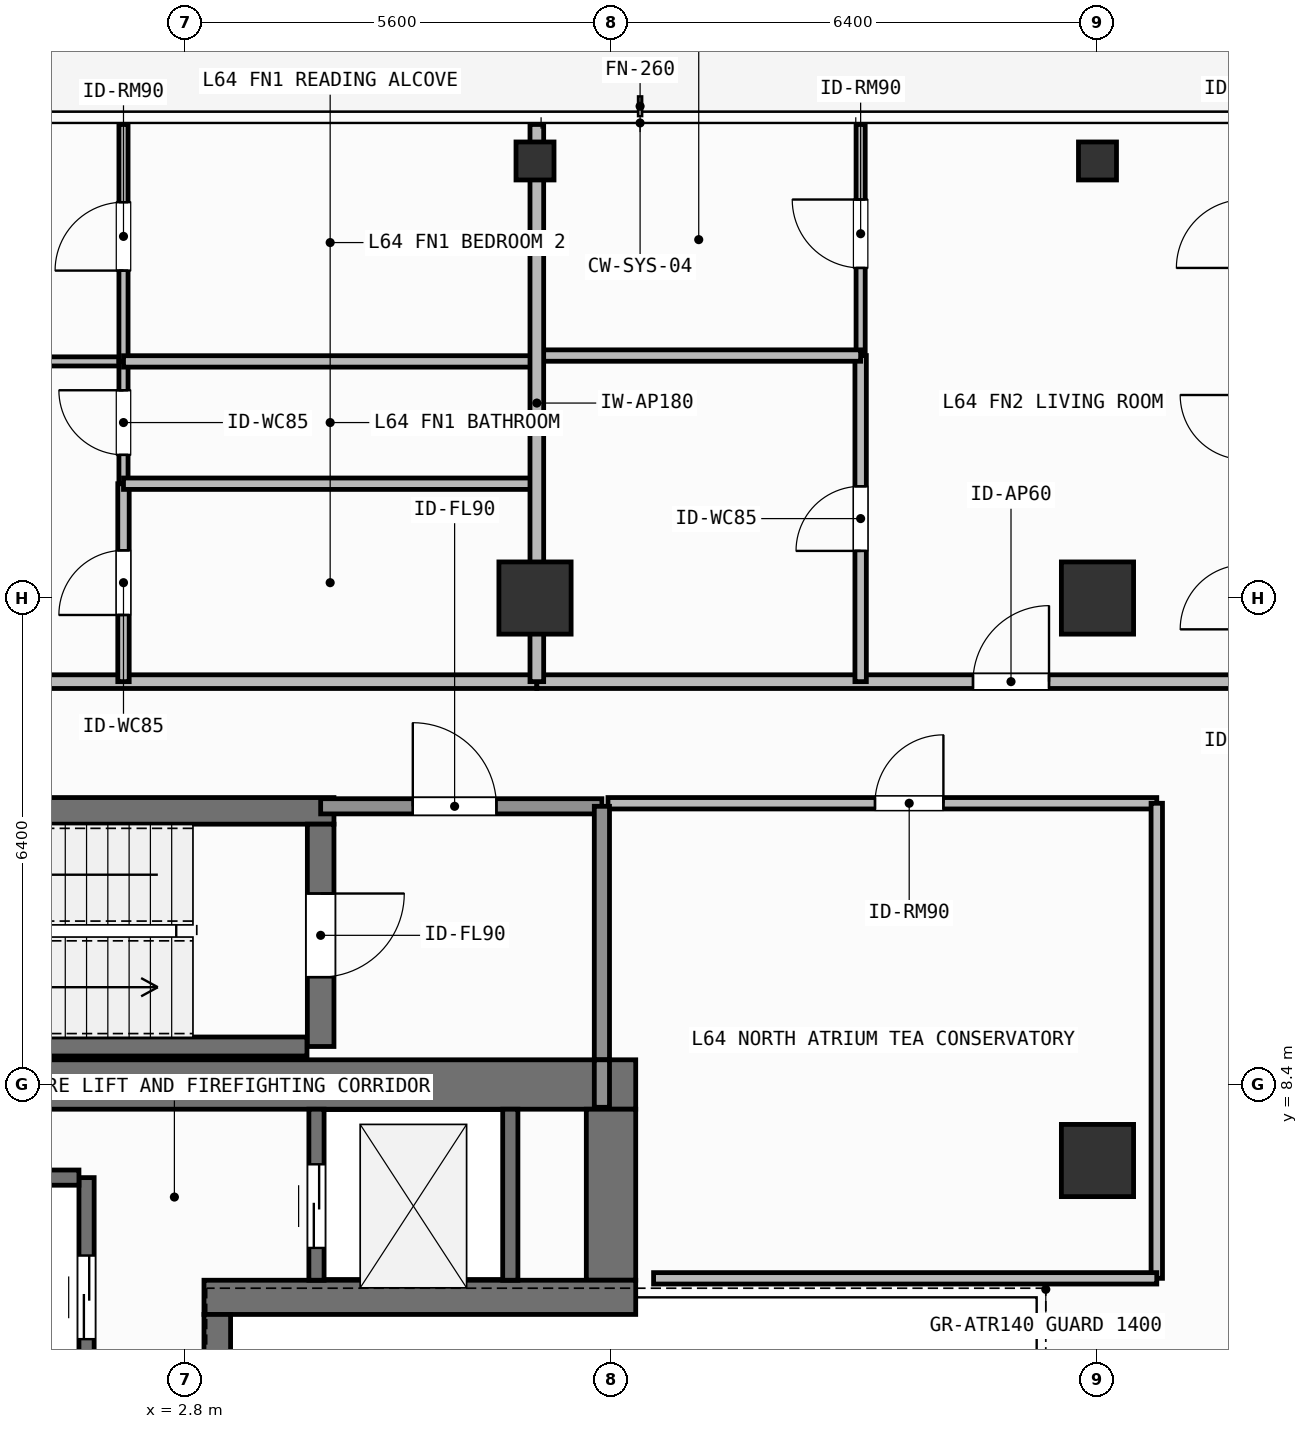
"""IFC4 building model, lengths in metres.
Left out: names, types, materials, properties, quantities, classifications, styles, units other than length and angle.
Written with IfcOpenShell. Run it as: python <this file> out.ifc"""

import sys

from ifc_helpers import new_model, si_unit, direction, frame, frame_2d, origin, origin_2d, place, context, subcontext, project, spatial, rectangle, hollow_rectangle, extrude, element, fill, save


model = new_model("IFC4")
c1 = context("Model", 3, precision=1e-05, world=origin(), true_north=direction((0.0, 1.0)))
c2 = subcontext(c1, "Body", "Model", "MODEL_VIEW")
j1 = project(units=[si_unit("LENGTHUNIT", "METRE"), si_unit("PLANEANGLEUNIT", "RADIAN")], contexts=[c1])
p1 = place(None, origin())
s1 = spatial("IfcSite", under=j1, at=p1, CompositionType="ELEMENT")
p2 = place(p1, origin())
s2 = spatial("IfcBuilding", under=s1, at=p2, CompositionType="ELEMENT")
p3 = place(p2, frame((0.0, 0.0, 262.5)))
s3 = spatial("IfcBuildingStorey", under=s2, at=p3, CompositionType="ELEMENT", Elevation=262.5)
p4 = place(p3, frame((-7.55, 8.4, 0.0), z_axis=(0.0, 0.0, 1.0), x_axis=(1.0, 0.0, 0.0)))
e1 = element("IfcWall", 1, at=p4, inside=s3, PredefinedType="SHEAR", context=c2, shape_type="SweptSolid", body=[
    extrude(rectangle(XDim=16.275, YDim=0.65, at=frame_2d((8.138, 0.0))), origin(), (0.0, 0.0, 1.0), 3.9),
])
p5 = place(p3, frame((8.4, 5.825, 0.0), z_axis=(0.0, 0.0, 1.0), x_axis=(0.0, 1.0, 0.0)))
e2 = element("IfcWall", 2, at=p5, inside=s3, PredefinedType="SHEAR", context=c2, shape_type="SweptSolid", body=[
    extrude(rectangle(XDim=2.25, YDim=0.65, at=frame_2d((1.125, 0.0))), origin(), (0.0, 0.0, 1.0), 3.9),
])
p6 = place(p3, frame((3.045, 5.6, 0.0), z_axis=(0.0, 0.0, 1.0), x_axis=(1.0, 0.0, 0.0)))
e3 = element("IfcWall", 3, at=p6, inside=s3, PredefinedType="SHEAR", context=c2, shape_type="SweptSolid", body=[
    extrude(rectangle(XDim=5.68, YDim=0.45, at=frame_2d((2.84, 0.0))), origin(), (0.0, 0.0, 1.0), 3.9),
])
p7 = place(p3, frame((3.22, -5.375, 0.0), z_axis=(0.0, 0.0, 1.0), x_axis=(0.0, 1.0, 0.0)))
e4 = element("IfcWall", 4, at=p7, inside=s3, PredefinedType="SHEAR", context=c2, shape_type="SweptSolid", body=[
    extrude(rectangle(XDim=10.75, YDim=0.35, at=frame_2d((5.375, 0.0))), origin(), (0.0, 0.0, 1.0), 3.9),
])
p8 = place(p3, frame((-2.555, 12.0, 0.0), z_axis=(0.0, 0.0, 1.0), x_axis=(1.0, 0.0, 0.0)))
e5 = element("IfcWall", 5, at=p8, inside=s3, PredefinedType="SHEAR", context=c2, shape_type="SweptSolid", body=[
    extrude(rectangle(XDim=7.31, YDim=0.35, at=frame_2d((3.655, 0.0))), origin(), (0.0, 0.0, 1.0), 3.9),
])
p9 = place(p3, frame((-2.2, 8.9, 0.0), z_axis=(0.0, 0.0, 1.0), x_axis=(1.0, 0.0, 0.0)))
e6 = element("IfcWall", 6, at=p9, inside=s3, PredefinedType="SHEAR", context=c2, shape_type="SweptSolid", body=[
    extrude(rectangle(XDim=6.6, YDim=0.25, at=frame_2d((3.3, 0.0))), origin(), (0.0, 0.0, 1.0), 3.9),
])
p10 = place(p3, frame((4.58, 11.825, 0.0), z_axis=(0.0, 0.0, 1.0), x_axis=(0.0, -1.0, 0.0)))
e7 = element("IfcWall", 7, at=p10, inside=s3, PredefinedType="SHEAR", context=c2, shape_type="SweptSolid", body=[
    extrude(rectangle(XDim=2.925, YDim=0.35, at=frame_2d((1.462, 0.0))), origin(), (0.0, 0.0, 1.0), 3.9),
])
p11 = place(p10, frame((0.913, 0.0, 0.0)))
e8 = element("IfcOpeningElement", 8, at=p11, cuts=e7, PredefinedType="OPENING", context=c2, shape_type="SweptSolid", body=[
    extrude(rectangle(XDim=1.1, YDim=2.15, at=frame_2d((0.55, 1.075))), frame((0.0, 0.185, 0.0), z_axis=(0.0, -1.0, 0.0), x_axis=(1.0, 0.0, 0.0)), (0.0, 0.0, 1.0), 0.37),
])
for number, where, z_axis, x_axis in (
    (9, (7.4, 14.8, 0.0), (0.0, 0.0, 1.0), (1.0, 0.0, 0.0)),
    (10, (14.8, 14.8, 0.0), (0.0, 0.0, 1.0), (1.0, 0.0, 0.0)),
    (11, (14.8, 7.4, 0.0), (0.0, 0.0, 1.0), (1.0, 0.0, 0.0)),
):
    element("IfcColumn", number, at=place(p3, frame(where, z_axis=z_axis, x_axis=x_axis)), inside=s3, PredefinedType="COLUMN", context=c2, shape_type="SweptSolid", body=[
        extrude(rectangle(XDim=0.95, YDim=0.95, at=origin_2d()), origin(), (0.0, 0.0, 1.0), 3.9),
    ])
for number, where, z_axis, x_axis in (
    (12, (7.4, 20.55, 0.0), (0.0, 0.0, 1.0), (1.0, 0.0, 0.0)),
    (13, (14.8, 20.55, 0.0), (0.0, 0.0, 1.0), (1.0, 0.0, 0.0)),
):
    element("IfcColumn", number, at=place(p3, frame(where, z_axis=z_axis, x_axis=x_axis)), inside=s3, PredefinedType="COLUMN", context=c2, shape_type="SweptSolid", body=[
        extrude(hollow_rectangle(XDim=0.5, YDim=0.5, WallThickness=0.025, at=origin_2d()), origin(), (0.0, 0.0, 1.0), 3.9),
    ])
p12 = place(p3, frame((1.5, 4.025, 0.0), z_axis=(0.0, 0.0, 1.0), x_axis=(0.0, 1.0, 0.0)))
e14 = element("IfcWall", 14, at=p12, inside=s3, PredefinedType="SHEAR", context=c2, shape_type="SweptSolid", body=[
    extrude(rectangle(XDim=3.15, YDim=0.2, at=frame_2d((1.575, 0.0))), origin(), (0.0, 0.0, 1.0), 3.68),
])
p13 = place(p12, frame((1.025, 0.0, 0.0)))
e15 = element("IfcOpeningElement", 15, at=p13, cuts=e14, PredefinedType="OPENING", context=c2, shape_type="SweptSolid", body=[
    extrude(rectangle(XDim=1.1, YDim=2.2, at=frame_2d((0.55, 1.1))), frame((0.0, 0.11, 0.0), z_axis=(0.0, -1.0, 0.0), x_axis=(1.0, 0.0, 0.0)), (0.0, 0.0, 1.0), 0.22),
])
p14 = place(p3, frame((-1.0, 7.175, 0.0), z_axis=(0.0, 0.0, 1.0), x_axis=(1.0, 0.0, 0.0)))
e16 = element("IfcWall", 16, at=p14, inside=s3, PredefinedType="SHEAR", context=c2, shape_type="SweptSolid", body=[
    extrude(rectangle(XDim=2.4, YDim=0.2, at=frame_2d((1.2, 0.0))), origin(), (0.0, 0.0, 1.0), 3.68),
])
p15 = place(p3, frame((4.525, 5.825, 0.0), z_axis=(0.0, 0.0, 1.0), x_axis=(0.0, 1.0, 0.0)))
e17 = element("IfcWall", 17, at=p15, inside=s3, PredefinedType="SHEAR", context=c2, shape_type="SweptSolid", body=[
    extrude(rectangle(XDim=2.25, YDim=0.2, at=frame_2d((1.125, 0.0))), origin(), (0.0, 0.0, 1.0), 3.68),
])
p16 = place(p15, frame((0.425, 0.0, 0.0)))
e18 = element("IfcOpeningElement", 18, at=p16, cuts=e17, PredefinedType="OPENING", context=c2, shape_type="SweptSolid", body=[
    extrude(rectangle(XDim=1.1, YDim=2.2, at=frame_2d((0.55, 1.1))), frame((0.0, 0.11, 0.0), z_axis=(0.0, -1.0, 0.0), x_axis=(1.0, 0.0, 0.0)), (0.0, 0.0, 1.0), 0.22),
])
p17 = place(p3, frame((7.075, 5.825, 0.0), z_axis=(0.0, 0.0, 1.0), x_axis=(0.0, 1.0, 0.0)))
e19 = element("IfcWall", 19, at=p17, inside=s3, PredefinedType="SHEAR", context=c2, shape_type="SweptSolid", body=[
    extrude(rectangle(XDim=2.25, YDim=0.2, at=frame_2d((1.125, 0.0))), origin(), (0.0, 0.0, 1.0), 3.68),
])
p18 = place(p3, frame((4.58, 12.06, 0.0), z_axis=(0.0, 0.0, 1.0), x_axis=(1.0, 0.0, 0.0)))
e20 = element("IfcWall", 20, at=p18, inside=s3, PredefinedType="SOLIDWALL", context=c2, shape_type="SweptSolid", body=[
    extrude(rectangle(XDim=3.7, YDim=0.2, at=frame_2d((1.85, 0.0))), origin(), (0.0, 0.0, 1.0), 3.68),
])
p19 = place(p18, frame((1.212, 0.0, 0.0)))
e21 = element("IfcOpeningElement", 21, at=p19, cuts=e20, PredefinedType="OPENING", context=c2, shape_type="SweptSolid", body=[
    extrude(rectangle(XDim=1.1, YDim=2.15, at=frame_2d((0.55, 1.075))), frame((0.0, 0.11, 0.0), z_axis=(0.0, -1.0, 0.0), x_axis=(1.0, 0.0, 0.0)), (0.0, 0.0, 1.0), 0.22),
])
p20 = place(p3, frame((8.36, 12.1, 0.0), z_axis=(0.0, 0.0, 1.0), x_axis=(1.0, 0.0, 0.0)))
e22 = element("IfcWall", 22, at=p20, inside=s3, PredefinedType="PARTITIONING", context=c2, shape_type="SweptSolid", body=[
    extrude(rectangle(XDim=7.22, YDim=0.15, at=frame_2d((3.61, 0.0))), origin(), (0.0, 0.0, 1.0), 3.68),
])
p21 = place(p20, frame((3.513, 0.0, 0.0)))
e23 = element("IfcOpeningElement", 23, at=p21, cuts=e22, PredefinedType="OPENING", context=c2, shape_type="SweptSolid", body=[
    extrude(rectangle(XDim=0.9, YDim=2.1, at=frame_2d((0.45, 1.05))), frame((0.0, 0.085, 0.0), z_axis=(0.0, -1.0, 0.0), x_axis=(1.0, 0.0, 0.0)), (0.0, 0.0, 1.0), 0.17),
])
p22 = place(p3, frame((-13.72, 13.7, 0.0), z_axis=(0.0, 0.0, 1.0), x_axis=(1.0, 0.0, 0.0)))
e24 = element("IfcWall", 24, at=p22, inside=s3, PredefinedType="PARTITIONING", context=c2, shape_type="SweptSolid", body=[
    extrude(rectangle(XDim=21.144, YDim=0.18, at=frame_2d((10.572, 0.0))), origin(), (0.0, 0.0, 1.0), 3.68),
])
p23 = place(p22, frame((9.625, 0.0, 0.0)))
e25 = element("IfcOpeningElement", 25, at=p23, cuts=e24, PredefinedType="OPENING", context=c2, shape_type="SweptSolid", body=[
    extrude(rectangle(XDim=1.0, YDim=2.2, at=frame_2d((0.5, 1.1))), frame((0.0, 0.1, 0.0), z_axis=(0.0, -1.0, 0.0), x_axis=(1.0, 0.0, 0.0)), (0.0, 0.0, 1.0), 0.2),
])
p24 = place(p3, frame((-9.395, 17.913, 0.0), z_axis=(0.0, 0.0, 1.0), x_axis=(1.0, 0.0, 0.0)))
e26 = element("IfcWall", 26, at=p24, inside=s3, PredefinedType="PARTITIONING", context=c2, shape_type="SweptSolid", body=[
    extrude(rectangle(XDim=11.381, YDim=0.12, at=frame_2d((5.69, 0.0))), origin(), (0.0, 0.0, 1.0), 3.68),
])
p25 = place(p24, frame((5.151, 0.0, 0.0)))
e27 = element("IfcOpeningElement", 27, at=p25, cuts=e26, PredefinedType="OPENING", context=c2, shape_type="SweptSolid", body=[
    extrude(rectangle(XDim=0.9, YDim=2.1, at=frame_2d((0.45, 1.05))), frame((0.0, 0.07, 0.0), z_axis=(0.0, -1.0, 0.0), x_axis=(1.0, 0.0, 0.0)), (0.0, 0.0, 1.0), 0.14),
])
p26 = place(p3, frame((1.986, 13.7, 0.0), z_axis=(0.0, 0.0, 1.0), x_axis=(0.0, 1.0, 0.0)))
e28 = element("IfcWall", 28, at=p26, inside=s3, PredefinedType="PARTITIONING", context=c2, shape_type="SweptSolid", body=[
    extrude(rectangle(XDim=2.604, YDim=0.15, at=frame_2d((1.302, 0.0))), origin(), (0.0, 0.0, 1.0), 3.68),
])
p27 = place(p26, frame((0.877, 0.0, 0.0)))
e29 = element("IfcOpeningElement", 29, at=p27, cuts=e28, PredefinedType="OPENING", context=c2, shape_type="SweptSolid", body=[
    extrude(rectangle(XDim=0.85, YDim=2.1, at=frame_2d((0.425, 1.05))), frame((0.0, 0.085, 0.0), z_axis=(0.0, -1.0, 0.0), x_axis=(1.0, 0.0, 0.0)), (0.0, 0.0, 1.0), 0.17),
])
p28 = place(p3, frame((1.986, 16.304, 0.0), z_axis=(0.0, 0.0, 1.0), x_axis=(0.0, 1.0, 0.0)))
e30 = element("IfcWall", 30, at=p28, inside=s3, PredefinedType="PARTITIONING", context=c2, shape_type="SweptSolid", body=[
    extrude(rectangle(XDim=1.609, YDim=0.12, at=frame_2d((0.805, 0.0))), origin(), (0.0, 0.0, 1.0), 3.68),
])
p29 = place(p28, frame((0.379, 0.0, 0.0)))
e31 = element("IfcOpeningElement", 31, at=p29, cuts=e30, PredefinedType="OPENING", context=c2, shape_type="SweptSolid", body=[
    extrude(rectangle(XDim=0.85, YDim=2.1, at=frame_2d((0.425, 1.05))), frame((0.0, 0.07, 0.0), z_axis=(0.0, -1.0, 0.0), x_axis=(1.0, 0.0, 0.0)), (0.0, 0.0, 1.0), 0.14),
])
p30 = place(p3, frame((1.986, 17.913, 0.0), z_axis=(0.0, 0.0, 1.0), x_axis=(0.0, 1.0, 0.0)))
e32 = element("IfcWall", 32, at=p30, inside=s3, PredefinedType="PARTITIONING", context=c2, shape_type="SweptSolid", body=[
    extrude(rectangle(XDim=3.117, YDim=0.12, at=frame_2d((1.559, 0.0))), origin(), (0.0, 0.0, 1.0), 3.68),
])
p31 = place(p30, frame((1.195, 0.0, 0.0)))
e33 = element("IfcOpeningElement", 33, at=p31, cuts=e32, PredefinedType="OPENING", context=c2, shape_type="SweptSolid", body=[
    extrude(rectangle(XDim=0.9, YDim=2.1, at=frame_2d((0.45, 1.05))), frame((0.0, 0.07, 0.0), z_axis=(0.0, -1.0, 0.0), x_axis=(1.0, 0.0, 0.0)), (0.0, 0.0, 1.0), 0.14),
])
p32 = place(p3, frame((7.424, 13.7, 0.0), z_axis=(0.0, 0.0, 1.0), x_axis=(1.0, 0.0, 0.0)))
e34 = element("IfcWall", 34, at=p32, inside=s3, PredefinedType="PARTITIONING", context=c2, shape_type="SweptSolid", body=[
    extrude(rectangle(XDim=14.096, YDim=0.18, at=frame_2d((7.048, 0.0))), origin(), (0.0, 0.0, 1.0), 3.68),
])
p33 = place(p32, frame((5.738, 0.0, 0.0)))
e35 = element("IfcOpeningElement", 35, at=p33, cuts=e34, PredefinedType="OPENING", context=c2, shape_type="SweptSolid", body=[
    extrude(rectangle(XDim=1.0, YDim=2.2, at=frame_2d((0.5, 1.1))), frame((0.0, 0.1, 0.0), z_axis=(0.0, -1.0, 0.0), x_axis=(1.0, 0.0, 0.0)), (0.0, 0.0, 1.0), 0.2),
])
p34 = place(p3, frame((11.684, 13.7, 0.0), z_axis=(0.0, 0.0, 1.0), x_axis=(0.0, 1.0, 0.0)))
e36 = element("IfcWall", 36, at=p34, inside=s3, PredefinedType="PARTITIONING", context=c2, shape_type="SweptSolid", body=[
    extrude(rectangle(XDim=4.29, YDim=0.15, at=frame_2d((2.145, 0.0))), origin(), (0.0, 0.0, 1.0), 3.68),
])
p35 = place(p34, frame((1.72, 0.0, 0.0)))
e37 = element("IfcOpeningElement", 37, at=p35, cuts=e36, PredefinedType="OPENING", context=c2, shape_type="SweptSolid", body=[
    extrude(rectangle(XDim=0.85, YDim=2.1, at=frame_2d((0.425, 1.05))), frame((0.0, 0.085, 0.0), z_axis=(0.0, -1.0, 0.0), x_axis=(1.0, 0.0, 0.0)), (0.0, 0.0, 1.0), 0.17),
])
p36 = place(p3, frame((11.684, 17.99, 0.0), z_axis=(0.0, 0.0, 1.0), x_axis=(0.0, 1.0, 0.0)))
e38 = element("IfcWall", 38, at=p36, inside=s3, PredefinedType="PARTITIONING", context=c2, shape_type="SweptSolid", body=[
    extrude(rectangle(XDim=3.04, YDim=0.12, at=frame_2d((1.52, 0.0))), origin(), (0.0, 0.0, 1.0), 3.68),
])
p37 = place(p36, frame((1.153, 0.0, 0.0)))
e39 = element("IfcOpeningElement", 39, at=p37, cuts=e38, PredefinedType="OPENING", context=c2, shape_type="SweptSolid", body=[
    extrude(rectangle(XDim=0.9, YDim=2.1, at=frame_2d((0.45, 1.05))), frame((0.0, 0.07, 0.0), z_axis=(0.0, -1.0, 0.0), x_axis=(1.0, 0.0, 0.0)), (0.0, 0.0, 1.0), 0.14),
])
p38 = place(p3, frame((8.28, 8.725, 0.0), z_axis=(0.0, 0.0, 1.0), x_axis=(0.0, 1.0, 0.0)))
e40 = element("IfcWall", 40, at=p38, inside=s3, PredefinedType="SOLIDWALL", context=c2, shape_type="SweptSolid", body=[
    extrude(rectangle(XDim=3.335, YDim=0.2, at=frame_2d((1.667, 0.0))), origin(), (0.0, 0.0, 1.0), 3.68),
])
p39 = place(p3, frame((8.28, 8.1, 0.0), z_axis=(0.0, 0.0, 1.0), x_axis=(0.0, 1.0, 0.0)))
e41 = element("IfcWall", 41, at=p39, inside=s3, PredefinedType="SOLIDWALL", context=c2, shape_type="SweptSolid", body=[
    extrude(rectangle(XDim=0.625, YDim=0.2, at=frame_2d((0.312, 0.0))), origin(), (0.0, 0.0, 1.0), 3.68),
])
p40 = place(p3, frame((15.58, 5.85, 0.0), z_axis=(0.0, 0.0, 1.0), x_axis=(0.0, 1.0, 0.0)))
e42 = element("IfcWall", 42, at=p40, inside=s3, PredefinedType="PARTITIONING", context=c2, shape_type="SweptSolid", body=[
    extrude(rectangle(XDim=6.25, YDim=0.15, at=frame_2d((3.125, 0.0))), origin(), (0.0, 0.0, 1.0), 3.68),
])
p41 = place(p3, frame((8.96, 5.85, 0.0), z_axis=(0.0, 0.0, 1.0), x_axis=(1.0, 0.0, 0.0)))
e43 = element("IfcWall", 43, at=p41, inside=s3, PredefinedType="PARTITIONING", context=c2, shape_type="SweptSolid", body=[
    extrude(rectangle(XDim=6.62, YDim=0.15, at=frame_2d((3.31, 0.0))), origin(), (0.0, 0.0, 1.0), 3.68),
])
for number, where, z_axis, x_axis in (
    (44, (1.986, 16.304, 0.0), (0.0, 0.0, 1.0), (1.0, 0.0, 0.0)),
    (45, (1.986, 17.913, 0.0), (0.0, 0.0, 1.0), (1.0, 0.0, 0.0)),
):
    element("IfcWall", number, at=place(p3, frame(where, z_axis=z_axis, x_axis=x_axis)), inside=s3, PredefinedType="PARTITIONING", context=c2, shape_type="SweptSolid", body=[
        extrude(rectangle(XDim=5.438, YDim=0.15, at=frame_2d((2.719, 0.0))), origin(), (0.0, 0.0, 1.0), 3.68),
    ])
p42 = place(p3, frame((7.424, 17.99, 0.0), z_axis=(0.0, 0.0, 1.0), x_axis=(1.0, 0.0, 0.0)))
e46 = element("IfcWall", 46, at=p42, inside=s3, PredefinedType="PARTITIONING", context=c2, shape_type="SweptSolid", body=[
    extrude(rectangle(XDim=4.26, YDim=0.15, at=frame_2d((2.13, 0.0))), origin(), (0.0, 0.0, 1.0), 3.68),
])
p43 = place(p3, frame((7.424, 13.7, 0.0), z_axis=(0.0, 0.0, 1.0), x_axis=(0.0, 1.0, 0.0)))
e47 = element("IfcWall", 47, at=p43, inside=s3, PredefinedType="PARTITIONING", context=c2, shape_type="SweptSolid", body=[
    extrude(rectangle(XDim=7.33, YDim=0.18, at=frame_2d((3.665, 0.0))), origin(), (0.0, 0.0, 1.0), 3.182),
])
p44 = place(p13, origin())
e48 = element("IfcDoor", 48, at=p44, inside=s3, OperationType="SLIDING_TO_LEFT", PredefinedType="DOOR", context=c2, shape_type="SweptSolid", body=[
    extrude(rectangle(XDim=1.1, YDim=2.2, at=frame_2d((0.55, 1.1))), frame((0.0, 0.025, 0.0), z_axis=(0.0, -1.0, 0.0), x_axis=(1.0, 0.0, 0.0)), (0.0, 0.0, 1.0), 0.05),
])
fill(e15, e48)
p45 = place(p16, origin())
e49 = element("IfcDoor", 49, at=p45, inside=s3, OperationType="SLIDING_TO_LEFT", PredefinedType="DOOR", context=c2, shape_type="SweptSolid", body=[
    extrude(rectangle(XDim=1.1, YDim=2.2, at=frame_2d((0.55, 1.1))), frame((0.0, 0.025, 0.0), z_axis=(0.0, -1.0, 0.0), x_axis=(1.0, 0.0, 0.0)), (0.0, 0.0, 1.0), 0.05),
])
fill(e18, e49)
p46 = place(p11, origin())
e50 = element("IfcDoor", 50, at=p46, inside=s3, OperationType="SINGLE_SWING_LEFT", PredefinedType="DOOR", context=c2, shape_type="SweptSolid", body=[
    extrude(rectangle(XDim=1.1, YDim=2.15, at=frame_2d((0.55, 1.075))), frame((0.0, 0.025, 0.0), z_axis=(0.0, -1.0, 0.0), x_axis=(1.0, 0.0, 0.0)), (0.0, 0.0, 1.0), 0.05),
])
fill(e8, e50)
p47 = place(p19, origin())
e51 = element("IfcDoor", 51, at=p47, inside=s3, OperationType="SINGLE_SWING_LEFT", PredefinedType="DOOR", context=c2, shape_type="SweptSolid", body=[
    extrude(rectangle(XDim=1.1, YDim=2.15, at=frame_2d((0.55, 1.075))), frame((0.0, 0.025, 0.0), z_axis=(0.0, -1.0, 0.0), x_axis=(1.0, 0.0, 0.0)), (0.0, 0.0, 1.0), 0.05),
])
fill(e21, e51)
p48 = place(p21, origin())
e52 = element("IfcDoor", 52, at=p48, inside=s3, OperationType="SINGLE_SWING_RIGHT", PredefinedType="DOOR", context=c2, shape_type="SweptSolid", body=[
    extrude(rectangle(XDim=0.9, YDim=2.1, at=frame_2d((0.45, 1.05))), frame((0.0, 0.025, 0.0), z_axis=(0.0, -1.0, 0.0), x_axis=(1.0, 0.0, 0.0)), (0.0, 0.0, 1.0), 0.05),
])
fill(e23, e52)
p49 = place(p27, origin())
e53 = element("IfcDoor", 53, at=p49, inside=s3, OperationType="SINGLE_SWING_LEFT", PredefinedType="DOOR", context=c2, shape_type="SweptSolid", body=[
    extrude(rectangle(XDim=0.85, YDim=2.1, at=frame_2d((0.425, 1.05))), frame((0.0, 0.025, 0.0), z_axis=(0.0, -1.0, 0.0), x_axis=(1.0, 0.0, 0.0)), (0.0, 0.0, 1.0), 0.05),
])
fill(e29, e53)
p50 = place(p29, origin())
e54 = element("IfcDoor", 54, at=p50, inside=s3, OperationType="SINGLE_SWING_RIGHT", PredefinedType="DOOR", context=c2, shape_type="SweptSolid", body=[
    extrude(rectangle(XDim=0.85, YDim=2.1, at=frame_2d((0.425, 1.05))), frame((0.0, 0.025, 0.0), z_axis=(0.0, -1.0, 0.0), x_axis=(1.0, 0.0, 0.0)), (0.0, 0.0, 1.0), 0.05),
])
fill(e31, e54)
p51 = place(p31, origin())
e55 = element("IfcDoor", 55, at=p51, inside=s3, OperationType="SINGLE_SWING_LEFT", PredefinedType="DOOR", context=c2, shape_type="SweptSolid", body=[
    extrude(rectangle(XDim=0.9, YDim=2.1, at=frame_2d((0.45, 1.05))), frame((0.0, 0.025, 0.0), z_axis=(0.0, -1.0, 0.0), x_axis=(1.0, 0.0, 0.0)), (0.0, 0.0, 1.0), 0.05),
])
fill(e33, e55)
p52 = place(p33, origin())
e56 = element("IfcDoor", 56, at=p52, inside=s3, OperationType="SINGLE_SWING_RIGHT", PredefinedType="DOOR", context=c2, shape_type="SweptSolid", body=[
    extrude(rectangle(XDim=1.0, YDim=2.2, at=frame_2d((0.5, 1.1))), frame((0.0, 0.025, 0.0), z_axis=(0.0, -1.0, 0.0), x_axis=(1.0, 0.0, 0.0)), (0.0, 0.0, 1.0), 0.05),
])
fill(e35, e56)
p53 = place(p35, origin())
e57 = element("IfcDoor", 57, at=p53, inside=s3, OperationType="SINGLE_SWING_LEFT", PredefinedType="DOOR", context=c2, shape_type="SweptSolid", body=[
    extrude(rectangle(XDim=0.85, YDim=2.1, at=frame_2d((0.425, 1.05))), frame((0.0, 0.025, 0.0), z_axis=(0.0, -1.0, 0.0), x_axis=(1.0, 0.0, 0.0)), (0.0, 0.0, 1.0), 0.05),
])
fill(e37, e57)
p54 = place(p37, origin())
e58 = element("IfcDoor", 58, at=p54, inside=s3, OperationType="SINGLE_SWING_RIGHT", PredefinedType="DOOR", context=c2, shape_type="SweptSolid", body=[
    extrude(rectangle(XDim=0.9, YDim=2.1, at=frame_2d((0.45, 1.05))), frame((0.0, 0.025, 0.0), z_axis=(0.0, -1.0, 0.0), x_axis=(1.0, 0.0, 0.0)), (0.0, 0.0, 1.0), 0.05),
])
fill(e39, e58)
save(model, sys.argv[1])
